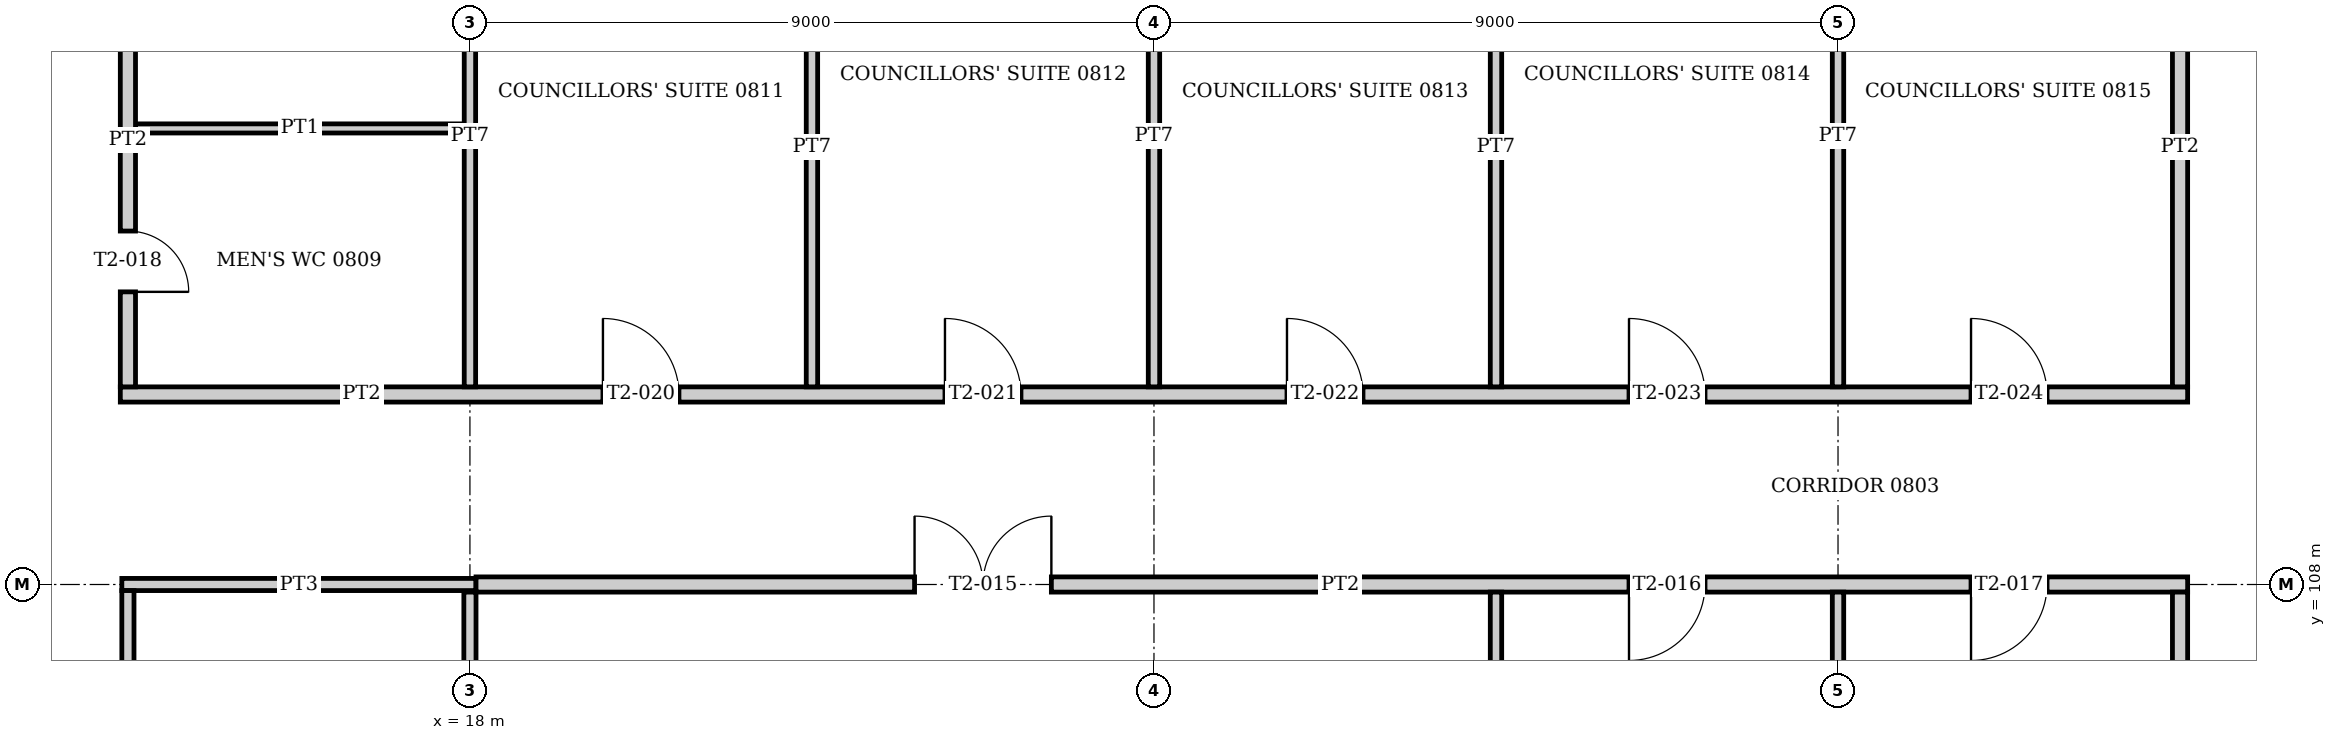
"""IFC4 building model, lengths in metres.
Left out: names, types, materials, properties, quantities, classifications, styles, units other than length and angle.
Written with IfcOpenShell. Run it as: python <this file> out.ifc"""

import sys

from ifc_helpers import new_model, si_unit, direction, frame, frame_2d, origin, place, context, subcontext, project, spatial, rectangle, extrude, element, fill, save


model = new_model("IFC4")
c1 = context("Model", 3, precision=1e-05, world=origin(), true_north=direction((0.0, 1.0)))
c2 = subcontext(c1, "Body", "Model", "MODEL_VIEW")
j1 = project(units=[si_unit("LENGTHUNIT", "METRE"), si_unit("PLANEANGLEUNIT", "RADIAN")], contexts=[c1])
p1 = place(None, origin())
s1 = spatial("IfcSite", under=j1, at=p1, CompositionType="ELEMENT")
p2 = place(p1, origin())
s2 = spatial("IfcBuilding", under=s1, at=p2, CompositionType="ELEMENT")
p3 = place(p2, frame((0.0, 0.0, 35.2)))
s3 = spatial("IfcBuildingStorey", under=s2, at=p3, CompositionType="ELEMENT", Elevation=35.2)
p4 = place(p3, frame((13.42, 108.0, 0.0), z_axis=(0.0, 0.0, 1.0), x_axis=(1.0, 0.0, 0.0)))
e1 = element("IfcWall", 1, at=p4, inside=s3, PredefinedType="PARTITIONING", context=c2, shape_type="SweptSolid", body=[
    extrude(rectangle(XDim=4.66, YDim=0.16, at=frame_2d((2.33, 0.0))), origin(), (0.0, 0.0, 1.0), 3.05),
])
p5 = place(p3, frame((18.08, 108.0, 0.0), z_axis=(0.0, 0.0, 1.0), x_axis=(1.0, 0.0, 0.0)))
e2 = element("IfcWall", 2, at=p5, inside=s3, PredefinedType="PARTITIONING", context=c2, shape_type="SweptSolid", body=[
    extrude(rectangle(XDim=22.52, YDim=0.2, at=frame_2d((11.26, 0.0))), origin(), (0.0, 0.0, 1.0), 3.05),
])
p6 = place(p5, frame((5.77, 0.0, 0.0)))
e3 = element("IfcOpeningElement", 3, at=p6, cuts=e2, PredefinedType="OPENING", context=c2, shape_type="SweptSolid", body=[
    extrude(rectangle(XDim=1.8, YDim=2.1, at=frame_2d((0.9, 1.05))), frame((0.0, 0.11, 0.0), z_axis=(0.0, -1.0, 0.0), x_axis=(1.0, 0.0, 0.0)), (0.0, 0.0, 1.0), 0.22),
])
p7 = place(p5, frame((15.17, 0.0, 0.0)))
e4 = element("IfcOpeningElement", 4, at=p7, cuts=e2, PredefinedType="OPENING", context=c2, shape_type="SweptSolid", body=[
    extrude(rectangle(XDim=1.0, YDim=2.1, at=frame_2d((0.5, 1.05))), frame((0.0, 0.11, 0.0), z_axis=(0.0, -1.0, 0.0), x_axis=(1.0, 0.0, 0.0)), (0.0, 0.0, 1.0), 0.22),
])
p8 = place(p5, frame((19.67, 0.0, 0.0)))
e5 = element("IfcOpeningElement", 5, at=p8, cuts=e2, PredefinedType="OPENING", context=c2, shape_type="SweptSolid", body=[
    extrude(rectangle(XDim=1.0, YDim=2.1, at=frame_2d((0.5, 1.05))), frame((0.0, 0.11, 0.0), z_axis=(0.0, -1.0, 0.0), x_axis=(1.0, 0.0, 0.0)), (0.0, 0.0, 1.0), 0.22),
])
p9 = place(p3, frame((13.4, 110.5, 0.0), z_axis=(0.0, 0.0, 1.0), x_axis=(1.0, 0.0, 0.0)))
e6 = element("IfcWall", 6, at=p9, inside=s3, PredefinedType="PARTITIONING", context=c2, shape_type="SweptSolid", body=[
    extrude(rectangle(XDim=27.2, YDim=0.2, at=frame_2d((13.6, 0.0))), origin(), (0.0, 0.0, 1.0), 3.05),
])
p10 = place(p9, frame((6.35, 0.0, 0.0)))
e7 = element("IfcOpeningElement", 7, at=p10, cuts=e6, PredefinedType="OPENING", context=c2, shape_type="SweptSolid", body=[
    extrude(rectangle(XDim=1.0, YDim=2.1, at=frame_2d((0.5, 1.05))), frame((0.0, 0.11, 0.0), z_axis=(0.0, -1.0, 0.0), x_axis=(1.0, 0.0, 0.0)), (0.0, 0.0, 1.0), 0.22),
])
p11 = place(p9, frame((10.85, 0.0, 0.0)))
e8 = element("IfcOpeningElement", 8, at=p11, cuts=e6, PredefinedType="OPENING", context=c2, shape_type="SweptSolid", body=[
    extrude(rectangle(XDim=1.0, YDim=2.1, at=frame_2d((0.5, 1.05))), frame((0.0, 0.11, 0.0), z_axis=(0.0, -1.0, 0.0), x_axis=(1.0, 0.0, 0.0)), (0.0, 0.0, 1.0), 0.22),
])
p12 = place(p9, frame((15.35, 0.0, 0.0)))
e9 = element("IfcOpeningElement", 9, at=p12, cuts=e6, PredefinedType="OPENING", context=c2, shape_type="SweptSolid", body=[
    extrude(rectangle(XDim=1.0, YDim=2.1, at=frame_2d((0.5, 1.05))), frame((0.0, 0.11, 0.0), z_axis=(0.0, -1.0, 0.0), x_axis=(1.0, 0.0, 0.0)), (0.0, 0.0, 1.0), 0.22),
])
p13 = place(p9, frame((19.85, 0.0, 0.0)))
e10 = element("IfcOpeningElement", 10, at=p13, cuts=e6, PredefinedType="OPENING", context=c2, shape_type="SweptSolid", body=[
    extrude(rectangle(XDim=1.0, YDim=2.1, at=frame_2d((0.5, 1.05))), frame((0.0, 0.11, 0.0), z_axis=(0.0, -1.0, 0.0), x_axis=(1.0, 0.0, 0.0)), (0.0, 0.0, 1.0), 0.22),
])
p14 = place(p9, frame((24.35, 0.0, 0.0)))
e11 = element("IfcOpeningElement", 11, at=p14, cuts=e6, PredefinedType="OPENING", context=c2, shape_type="SweptSolid", body=[
    extrude(rectangle(XDim=1.0, YDim=2.1, at=frame_2d((0.5, 1.05))), frame((0.0, 0.11, 0.0), z_axis=(0.0, -1.0, 0.0), x_axis=(1.0, 0.0, 0.0)), (0.0, 0.0, 1.0), 0.22),
])
p15 = place(p3, frame((13.6, 114.0, 0.0), z_axis=(0.0, 0.0, 1.0), x_axis=(1.0, 0.0, 0.0)))
e12 = element("IfcWall", 12, at=p15, inside=s3, PredefinedType="PARTITIONING", context=c2, shape_type="SweptSolid", body=[
    extrude(rectangle(XDim=4.325, YDim=0.12, at=frame_2d((2.163, 0.0))), origin(), (0.0, 0.0, 1.0), 3.05),
])
p16 = place(p3, frame((13.5, 103.58, 0.0), z_axis=(0.0, 0.0, 1.0), x_axis=(0.0, 1.0, 0.0)))
e13 = element("IfcWall", 13, at=p16, inside=s3, PredefinedType="PARTITIONING", context=c2, shape_type="SweptSolid", body=[
    extrude(rectangle(XDim=4.34, YDim=0.16, at=frame_2d((2.17, 0.0))), origin(), (0.0, 0.0, 1.0), 3.05),
])
p17 = place(p16, frame((1.795, 0.0, 0.0)))
e14 = element("IfcOpeningElement", 14, at=p17, cuts=e13, PredefinedType="OPENING", context=c2, shape_type="SweptSolid", body=[
    extrude(rectangle(XDim=0.75, YDim=2.1, at=frame_2d((0.375, 1.05))), frame((0.0, 0.09, 0.0), z_axis=(0.0, -1.0, 0.0), x_axis=(1.0, 0.0, 0.0)), (0.0, 0.0, 1.0), 0.18),
])
p18 = place(p3, frame((13.5, 110.6, 0.0), z_axis=(0.0, 0.0, 1.0), x_axis=(0.0, 1.0, 0.0)))
e15 = element("IfcWall", 15, at=p18, inside=s3, PredefinedType="PARTITIONING", context=c2, shape_type="SweptSolid", body=[
    extrude(rectangle(XDim=6.31, YDim=0.2, at=frame_2d((3.155, 0.0))), origin(), (0.0, 0.0, 1.0), 3.05),
])
p19 = place(p18, frame((1.25, 0.0, 0.0)))
e16 = element("IfcOpeningElement", 16, at=p19, cuts=e15, PredefinedType="OPENING", context=c2, shape_type="SweptSolid", body=[
    extrude(rectangle(XDim=0.8, YDim=2.1, at=frame_2d((0.4, 1.05))), frame((0.0, 0.11, 0.0), z_axis=(0.0, -1.0, 0.0), x_axis=(1.0, 0.0, 0.0)), (0.0, 0.0, 1.0), 0.22),
])
p20 = place(p18, frame((4.44, 0.0, 0.0)))
e17 = element("IfcOpeningElement", 17, at=p20, cuts=e15, PredefinedType="OPENING", context=c2, shape_type="SweptSolid", body=[
    extrude(rectangle(XDim=0.92, YDim=2.1, at=frame_2d((0.46, 1.05))), frame((0.0, 0.11, 0.0), z_axis=(0.0, -1.0, 0.0), x_axis=(1.0, 0.0, 0.0)), (0.0, 0.0, 1.0), 0.22),
])
p21 = place(p3, frame((18.0, 103.58, 0.0), z_axis=(0.0, 0.0, 1.0), x_axis=(0.0, 1.0, 0.0)))
e18 = element("IfcWall", 18, at=p21, inside=s3, PredefinedType="PARTITIONING", context=c2, shape_type="SweptSolid", body=[
    extrude(rectangle(XDim=4.32, YDim=0.16, at=frame_2d((2.16, 0.0))), origin(), (0.0, 0.0, 1.0), 3.05),
])
p22 = place(p3, frame((18.0, 110.6, 0.0), z_axis=(0.0, 0.0, 1.0), x_axis=(0.0, 1.0, 0.0)))
e19 = element("IfcWall", 19, at=p22, inside=s3, PredefinedType="PARTITIONING", context=c2, shape_type="SweptSolid", body=[
    extrude(rectangle(XDim=6.6, YDim=0.15, at=frame_2d((3.3, 0.0))), origin(), (0.0, 0.0, 1.0), 3.05),
])
p23 = place(p3, frame((22.5, 110.6, 0.0), z_axis=(0.0, 0.0, 1.0), x_axis=(0.0, 1.0, 0.0)))
e20 = element("IfcWall", 20, at=p23, inside=s3, PredefinedType="PARTITIONING", context=c2, shape_type="SweptSolid", body=[
    extrude(rectangle(XDim=6.31, YDim=0.15, at=frame_2d((3.155, 0.0))), origin(), (0.0, 0.0, 1.0), 3.05),
])
p24 = place(p3, frame((27.0, 110.6, 0.0), z_axis=(0.0, 0.0, 1.0), x_axis=(0.0, 1.0, 0.0)))
e21 = element("IfcWall", 21, at=p24, inside=s3, PredefinedType="PARTITIONING", context=c2, shape_type="SweptSolid", body=[
    extrude(rectangle(XDim=6.6, YDim=0.15, at=frame_2d((3.3, 0.0))), origin(), (0.0, 0.0, 1.0), 3.05),
])
p25 = place(p3, frame((31.5, 99.075, 0.0), z_axis=(0.0, 0.0, 1.0), x_axis=(0.0, 1.0, 0.0)))
e22 = element("IfcWall", 22, at=p25, inside=s3, PredefinedType="PARTITIONING", context=c2, shape_type="SweptSolid", body=[
    extrude(rectangle(XDim=8.825, YDim=0.15, at=frame_2d((4.413, 0.0))), origin(), (0.0, 0.0, 1.0), 3.05),
])
p26 = place(p3, frame((31.5, 110.6, 0.0), z_axis=(0.0, 0.0, 1.0), x_axis=(0.0, 1.0, 0.0)))
e23 = element("IfcWall", 23, at=p26, inside=s3, PredefinedType="PARTITIONING", context=c2, shape_type="SweptSolid", body=[
    extrude(rectangle(XDim=6.31, YDim=0.15, at=frame_2d((3.155, 0.0))), origin(), (0.0, 0.0, 1.0), 3.05),
])
p27 = place(p3, frame((36.0, 99.207, 0.0), z_axis=(0.0, 0.0, 1.0), x_axis=(0.0, 1.0, 0.0)))
e24 = element("IfcWall", 24, at=p27, inside=s3, PredefinedType="PARTITIONING", context=c2, shape_type="SweptSolid", body=[
    extrude(rectangle(XDim=8.693, YDim=0.15, at=frame_2d((4.346, 0.0))), origin(), (0.0, 0.0, 1.0), 3.05),
])
p28 = place(p3, frame((36.0, 110.6, 0.0), z_axis=(0.0, 0.0, 1.0), x_axis=(0.0, 1.0, 0.0)))
e25 = element("IfcWall", 25, at=p28, inside=s3, PredefinedType="PARTITIONING", context=c2, shape_type="SweptSolid", body=[
    extrude(rectangle(XDim=6.6, YDim=0.15, at=frame_2d((3.3, 0.0))), origin(), (0.0, 0.0, 1.0), 3.05),
])
p29 = place(p3, frame((40.5, 99.075, 0.0), z_axis=(0.0, 0.0, 1.0), x_axis=(0.0, 1.0, 0.0)))
e26 = element("IfcWall", 26, at=p29, inside=s3, PredefinedType="PARTITIONING", context=c2, shape_type="SweptSolid", body=[
    extrude(rectangle(XDim=8.825, YDim=0.2, at=frame_2d((4.413, 0.0))), origin(), (0.0, 0.0, 1.0), 3.05),
])
p30 = place(p3, frame((40.5, 110.6, 0.0), z_axis=(0.0, 0.0, 1.0), x_axis=(0.0, 1.0, 0.0)))
e27 = element("IfcWall", 27, at=p30, inside=s3, PredefinedType="PARTITIONING", context=c2, shape_type="SweptSolid", body=[
    extrude(rectangle(XDim=6.31, YDim=0.2, at=frame_2d((3.155, 0.0))), origin(), (0.0, 0.0, 1.0), 3.05),
])
p31 = place(p6, origin())
e28 = element("IfcDoor", 28, at=p31, inside=s3, OperationType="DOUBLE_DOOR_SINGLE_SWING", PredefinedType="DOOR", context=c2, shape_type="SweptSolid", body=[
    extrude(rectangle(XDim=1.8, YDim=2.1, at=frame_2d((0.9, 1.05))), frame((0.0, 0.025, 0.0), z_axis=(0.0, -1.0, 0.0), x_axis=(1.0, 0.0, 0.0)), (0.0, 0.0, 1.0), 0.05),
])
fill(e3, e28)
p32 = place(p7, frame((1.0, 0.0, 0.0), z_axis=(0.0, 0.0, 1.0), x_axis=(-1.0, 0.0, 0.0)))
e29 = element("IfcDoor", 29, at=p32, inside=s3, OperationType="SINGLE_SWING_RIGHT", PredefinedType="DOOR", context=c2, shape_type="SweptSolid", body=[
    extrude(rectangle(XDim=1.0, YDim=2.1, at=frame_2d((0.5, 1.05))), frame((0.0, 0.025, 0.0), z_axis=(0.0, -1.0, 0.0), x_axis=(1.0, 0.0, 0.0)), (0.0, 0.0, 1.0), 0.05),
])
fill(e4, e29)
p33 = place(p8, frame((1.0, 0.0, 0.0), z_axis=(0.0, 0.0, 1.0), x_axis=(-1.0, 0.0, 0.0)))
e30 = element("IfcDoor", 30, at=p33, inside=s3, OperationType="SINGLE_SWING_RIGHT", PredefinedType="DOOR", context=c2, shape_type="SweptSolid", body=[
    extrude(rectangle(XDim=1.0, YDim=2.1, at=frame_2d((0.5, 1.05))), frame((0.0, 0.025, 0.0), z_axis=(0.0, -1.0, 0.0), x_axis=(1.0, 0.0, 0.0)), (0.0, 0.0, 1.0), 0.05),
])
fill(e5, e30)
p34 = place(p19, frame((0.8, 0.0, 0.0), z_axis=(0.0, 0.0, 1.0), x_axis=(-1.0, 0.0, 0.0)))
e31 = element("IfcDoor", 31, at=p34, inside=s3, OperationType="SINGLE_SWING_RIGHT", PredefinedType="DOOR", context=c2, shape_type="SweptSolid", body=[
    extrude(rectangle(XDim=0.8, YDim=2.1, at=frame_2d((0.4, 1.05))), frame((0.0, 0.025, 0.0), z_axis=(0.0, -1.0, 0.0), x_axis=(1.0, 0.0, 0.0)), (0.0, 0.0, 1.0), 0.05),
])
fill(e16, e31)
p35 = place(p10, origin())
e32 = element("IfcDoor", 32, at=p35, inside=s3, OperationType="SINGLE_SWING_LEFT", PredefinedType="DOOR", context=c2, shape_type="SweptSolid", body=[
    extrude(rectangle(XDim=1.0, YDim=2.1, at=frame_2d((0.5, 1.05))), frame((0.0, 0.025, 0.0), z_axis=(0.0, -1.0, 0.0), x_axis=(1.0, 0.0, 0.0)), (0.0, 0.0, 1.0), 0.05),
])
fill(e7, e32)
p36 = place(p11, origin())
e33 = element("IfcDoor", 33, at=p36, inside=s3, OperationType="SINGLE_SWING_LEFT", PredefinedType="DOOR", context=c2, shape_type="SweptSolid", body=[
    extrude(rectangle(XDim=1.0, YDim=2.1, at=frame_2d((0.5, 1.05))), frame((0.0, 0.025, 0.0), z_axis=(0.0, -1.0, 0.0), x_axis=(1.0, 0.0, 0.0)), (0.0, 0.0, 1.0), 0.05),
])
fill(e8, e33)
p37 = place(p12, origin())
e34 = element("IfcDoor", 34, at=p37, inside=s3, OperationType="SINGLE_SWING_LEFT", PredefinedType="DOOR", context=c2, shape_type="SweptSolid", body=[
    extrude(rectangle(XDim=1.0, YDim=2.1, at=frame_2d((0.5, 1.05))), frame((0.0, 0.025, 0.0), z_axis=(0.0, -1.0, 0.0), x_axis=(1.0, 0.0, 0.0)), (0.0, 0.0, 1.0), 0.05),
])
fill(e9, e34)
p38 = place(p13, origin())
e35 = element("IfcDoor", 35, at=p38, inside=s3, OperationType="SINGLE_SWING_LEFT", PredefinedType="DOOR", context=c2, shape_type="SweptSolid", body=[
    extrude(rectangle(XDim=1.0, YDim=2.1, at=frame_2d((0.5, 1.05))), frame((0.0, 0.025, 0.0), z_axis=(0.0, -1.0, 0.0), x_axis=(1.0, 0.0, 0.0)), (0.0, 0.0, 1.0), 0.05),
])
fill(e10, e35)
p39 = place(p14, origin())
e36 = element("IfcDoor", 36, at=p39, inside=s3, OperationType="SINGLE_SWING_LEFT", PredefinedType="DOOR", context=c2, shape_type="SweptSolid", body=[
    extrude(rectangle(XDim=1.0, YDim=2.1, at=frame_2d((0.5, 1.05))), frame((0.0, 0.025, 0.0), z_axis=(0.0, -1.0, 0.0), x_axis=(1.0, 0.0, 0.0)), (0.0, 0.0, 1.0), 0.05),
])
fill(e11, e36)
save(model, sys.argv[1])
